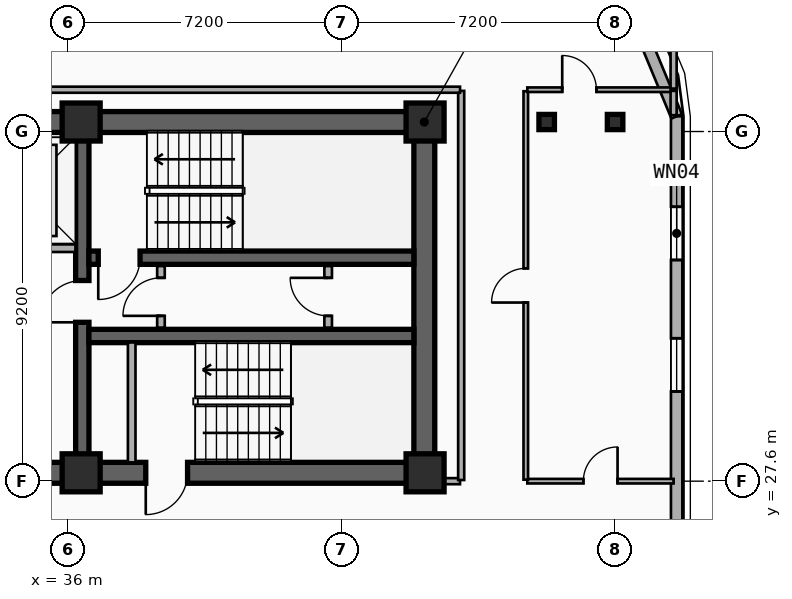
"""IFC4 building model, lengths in metres.
Left out: names, types, materials, properties, quantities, classifications, styles, units other than length and angle.
Written with IfcOpenShell. Run it as: python <this file> out.ifc"""

import sys

from ifc_helpers import new_model, si_unit, direction, frame, frame_2d, origin, origin_2d, place, context, subcontext, project, spatial, rectangle, i_section, extrude, element, fill, save


model = new_model("IFC4")
c1 = context("Model", 3, precision=1e-05, world=origin(), true_north=direction((0.0, 1.0)))
c2 = subcontext(c1, "Body", "Model", "MODEL_VIEW")
j1 = project(units=[si_unit("LENGTHUNIT", "METRE"), si_unit("PLANEANGLEUNIT", "RADIAN")], contexts=[c1])
p1 = place(None, origin())
s1 = spatial("IfcSite", under=j1, at=p1, CompositionType="ELEMENT")
p2 = place(p1, origin())
s2 = spatial("IfcBuilding", under=s1, at=p2, CompositionType="ELEMENT")
p3 = place(p2, frame((0.0, 0.0, 200.4)))
s3 = spatial("IfcBuildingStorey", under=s2, at=p3, CompositionType="ELEMENT", Elevation=200.4)
p4 = place(p3, frame((12.15, 37.05, 0.0), z_axis=(0.0, 0.0, 1.0), x_axis=(1.0, 0.0, 0.0)))
e1 = element("IfcWall", 1, at=p4, inside=s3, PredefinedType="SHEAR", context=c2, shape_type="SweptSolid", body=[
    extrude(rectangle(XDim=33.23, YDim=0.55, at=frame_2d((16.615, 0.0))), origin(), (0.0, 0.0, 1.0), 3.6),
])
p5 = place(p3, frame((45.38, 27.82, 0.0), z_axis=(0.0, 0.0, 1.0), x_axis=(-1.0, 0.0, 0.0)))
e2 = element("IfcWall", 2, at=p5, inside=s3, PredefinedType="SHEAR", context=c2, shape_type="SweptSolid", body=[
    extrude(rectangle(XDim=12.23, YDim=0.55, at=frame_2d((6.115, 0.0))), origin(), (0.0, 0.0, 1.0), 3.6),
])
p6 = place(p5, frame((9.93, 0.0, 0.0)))
e3 = element("IfcOpeningElement", 3, at=p6, cuts=e2, PredefinedType="OPENING", context=c2, shape_type="SweptSolid", body=[
    extrude(rectangle(XDim=1.1, YDim=2.15, at=frame_2d((0.55, 1.075))), frame((0.0, 0.285, 0.0), z_axis=(0.0, -1.0, 0.0), x_axis=(1.0, 0.0, 0.0)), (0.0, 0.0, 1.0), 0.57),
])
p7 = place(p5, frame((6.23, 0.0, 0.0)))
e4 = element("IfcOpeningElement", 4, at=p7, cuts=e2, PredefinedType="OPENING", context=c2, shape_type="SweptSolid", body=[
    extrude(rectangle(XDim=1.1, YDim=2.15, at=frame_2d((0.55, 1.075))), frame((0.0, 0.285, 0.0), z_axis=(0.0, -1.0, 0.0), x_axis=(1.0, 0.0, 0.0)), (0.0, 0.0, 1.0), 0.57),
])
p8 = place(p3, frame((45.38, 28.095, 0.0), z_axis=(0.0, 0.0, 1.0), x_axis=(0.0, 1.0, 0.0)))
e5 = element("IfcWall", 5, at=p8, inside=s3, PredefinedType="SHEAR", context=c2, shape_type="SweptSolid", body=[
    extrude(rectangle(XDim=8.68, YDim=0.55, at=frame_2d((4.34, 0.0))), origin(), (0.0, 0.0, 1.0), 3.6),
])
p9 = place(p3, frame((36.38, 28.095, 0.0), z_axis=(0.0, 0.0, 1.0), x_axis=(0.0, 1.0, 0.0)))
e6 = element("IfcWall", 6, at=p9, inside=s3, PredefinedType="SHEAR", context=c2, shape_type="SweptSolid", body=[
    extrude(rectangle(XDim=8.68, YDim=0.35, at=frame_2d((4.34, 0.0))), origin(), (0.0, 0.0, 1.0), 3.6),
])
p10 = place(p9, frame((3.685, 0.0, 0.0)))
e7 = element("IfcOpeningElement", 7, at=p10, cuts=e6, PredefinedType="OPENING", context=c2, shape_type="SweptSolid", body=[
    extrude(rectangle(XDim=1.1, YDim=2.15, at=frame_2d((0.55, 1.075))), frame((0.0, 0.185, 0.0), z_axis=(0.0, -1.0, 0.0), x_axis=(1.0, 0.0, 0.0)), (0.0, 0.0, 1.0), 0.37),
])
p11 = place(p3, frame((45.105, 33.48, 0.0), z_axis=(0.0, 0.0, 1.0), x_axis=(-1.0, 0.0, 0.0)))
e8 = element("IfcWall", 8, at=p11, inside=s3, PredefinedType="SHEAR", context=c2, shape_type="SweptSolid", body=[
    extrude(rectangle(XDim=8.55, YDim=0.35, at=frame_2d((4.275, 0.0))), origin(), (0.0, 0.0, 1.0), 3.6),
])
p12 = place(p11, frame((7.205, 0.0, 0.0)))
e9 = element("IfcOpeningElement", 9, at=p12, cuts=e8, PredefinedType="OPENING", context=c2, shape_type="SweptSolid", body=[
    extrude(rectangle(XDim=1.1, YDim=2.15, at=frame_2d((0.55, 1.075))), frame((0.0, 0.185, 0.0), z_axis=(0.0, -1.0, 0.0), x_axis=(1.0, 0.0, 0.0)), (0.0, 0.0, 1.0), 0.37),
])
p13 = place(p3, frame((36.555, 31.42, 0.0), z_axis=(0.0, 0.0, 1.0), x_axis=(1.0, 0.0, 0.0)))
e10 = element("IfcWall", 10, at=p13, inside=s3, PredefinedType="SHEAR", context=c2, shape_type="SweptSolid", body=[
    extrude(rectangle(XDim=8.55, YDim=0.35, at=frame_2d((4.275, 0.0))), origin(), (0.0, 0.0, 1.0), 3.6),
])
for number, where, z_axis, x_axis in (
    (11, (36.35, 27.82, 0.0), (0.0, 0.0, 1.0), (1.0, 0.0, 0.0)),
    (12, (36.35, 37.05, 0.0), (0.0, 0.0, 1.0), (1.0, 0.0, 0.0)),
    (13, (45.4, 27.82, 0.0), (0.0, 0.0, 1.0), (1.0, 0.0, 0.0)),
    (14, (45.4, 37.05, 0.0), (0.0, 0.0, 1.0), (1.0, 0.0, 0.0)),
):
    element("IfcColumn", number, at=place(p3, frame(where, z_axis=z_axis, x_axis=x_axis)), inside=s3, PredefinedType="COLUMN", context=c2, shape_type="SweptSolid", body=[
        extrude(rectangle(XDim=1.0, YDim=1.0, at=origin_2d()), origin(), (0.0, 0.0, 1.0), 3.6),
    ])
for number, where, z_axis, x_axis in (
    (15, (48.6, 37.05, 0.0), (0.0, 0.0, 1.0), (1.0, 0.0, 0.0)),
    (16, (50.4, 37.05, 0.0), (0.0, 0.0, 1.0), (1.0, 0.0, 0.0)),
):
    element("IfcColumn", number, at=place(p3, frame(where, z_axis=z_axis, x_axis=x_axis)), inside=s3, PredefinedType="COLUMN", context=c2, shape_type="SweptSolid", body=[
        extrude(i_section(OverallWidth=0.408, OverallDepth=0.4, WebThickness=0.025, FlangeThickness=0.039, FilletRadius=0.015, at=origin_2d()), origin(), (0.0, 0.0, 1.0), 3.6),
    ])
p14 = place(p3, frame((52.02, 37.2, 0.0), z_axis=(0.0, 0.0, 1.0), x_axis=(0.0, -1.0, 0.0)))
e17 = element("IfcWall", 17, at=p14, inside=s3, PredefinedType="SOLIDWALL", context=c2, shape_type="SweptSolid", body=[
    extrude(rectangle(XDim=28.6, YDim=0.3, at=frame_2d((14.3, 0.0))), origin(), (0.0, 0.0, 1.0), 3.34),
])
p15 = place(p14, frame((2.38, 0.0, 0.34)))
e18 = element("IfcOpeningElement", 18, at=p15, cuts=e17, PredefinedType="OPENING", context=c2, shape_type="SweptSolid", body=[
    extrude(rectangle(XDim=1.4, YDim=2.1, at=frame_2d((0.7, 1.05))), frame((0.0, 0.16, 0.0), z_axis=(0.0, -1.0, 0.0), x_axis=(1.0, 0.0, 0.0)), (0.0, 0.0, 1.0), 0.32),
])
p16 = place(p14, frame((5.84, 0.0, 0.34)))
e19 = element("IfcOpeningElement", 19, at=p16, cuts=e17, PredefinedType="OPENING", context=c2, shape_type="SweptSolid", body=[
    extrude(rectangle(XDim=1.4, YDim=2.1, at=frame_2d((0.7, 1.05))), frame((0.0, 0.16, 0.0), z_axis=(0.0, -1.0, 0.0), x_axis=(1.0, 0.0, 0.0)), (0.0, 0.0, 1.0), 0.32),
])
p17 = place(p14, frame((16.527, 0.0, 0.34)))
e20 = element("IfcOpeningElement", 20, at=p17, cuts=e17, PredefinedType="OPENING", context=c2, shape_type="SweptSolid", body=[
    extrude(rectangle(XDim=1.4, YDim=2.1, at=frame_2d((0.7, 1.05))), frame((0.0, 0.16, 0.0), z_axis=(0.0, -1.0, 0.0), x_axis=(1.0, 0.0, 0.0)), (0.0, 0.0, 1.0), 0.32),
])
p18 = place(p14, frame((22.403, 0.0, 0.34)))
e21 = element("IfcOpeningElement", 21, at=p18, cuts=e17, PredefinedType="OPENING", context=c2, shape_type="SweptSolid", body=[
    extrude(rectangle(XDim=1.4, YDim=2.1, at=frame_2d((0.7, 1.05))), frame((0.0, 0.16, 0.0), z_axis=(0.0, -1.0, 0.0), x_axis=(1.0, 0.0, 0.0)), (0.0, 0.0, 1.0), 0.32),
])
p19 = place(p3, frame((50.843, 40.042, 0.0), z_axis=(0.0, 0.0, 1.0), x_axis=(0.382704529509, -0.923870793506, 0.0)))
e22 = element("IfcWall", 22, at=p19, inside=s3, PredefinedType="SOLIDWALL", context=c2, shape_type="SweptSolid", body=[
    extrude(rectangle(XDim=3.077, YDim=0.3, at=frame_2d((1.538, 0.0))), origin(), (0.0, 0.0, 1.0), 3.34),
])
p20 = place(p3, frame((33.475, 33.73, 0.0), z_axis=(0.0, 0.0, 1.0), x_axis=(1.0, 0.0, 0.0)))
e23 = element("IfcWall", 23, at=p20, inside=s3, PredefinedType="PARTITIONING", context=c2, shape_type="SweptSolid", body=[
    extrude(rectangle(XDim=2.725, YDim=0.2, at=frame_2d((1.362, 0.0))), origin(), (0.0, 0.0, 1.0), 2.41),
])
p21 = place(p20, frame((0.812, 0.0, 0.0)))
e24 = element("IfcOpeningElement", 24, at=p21, cuts=e23, PredefinedType="OPENING", context=c2, shape_type="SweptSolid", body=[
    extrude(rectangle(XDim=1.1, YDim=2.15, at=frame_2d((0.55, 1.075))), frame((0.0, 0.11, 0.0), z_axis=(0.0, -1.0, 0.0), x_axis=(1.0, 0.0, 0.0)), (0.0, 0.0, 1.0), 0.22),
])
p22 = place(p3, frame((37.68, 28.095, 0.0), z_axis=(0.0, 0.0, 1.0), x_axis=(0.0, 1.0, 0.0)))
e25 = element("IfcWall", 25, at=p22, inside=s3, PredefinedType="PARTITIONING", context=c2, shape_type="SweptSolid", body=[
    extrude(rectangle(XDim=3.155, YDim=0.2, at=frame_2d((1.578, 0.0))), origin(), (0.0, 0.0, 1.0), 2.72),
])
p23 = place(p3, frame((38.45, 31.64, 0.0), z_axis=(0.0, 0.0, 1.0), x_axis=(0.0, 1.0, 0.0)))
e26 = element("IfcWall", 26, at=p23, inside=s3, PredefinedType="PARTITIONING", context=c2, shape_type="SweptSolid", body=[
    extrude(rectangle(XDim=1.62, YDim=0.2, at=frame_2d((0.81, 0.0))), origin(), (0.0, 0.0, 1.0), 3.34),
])
p24 = place(p23, frame((0.31, 0.0, 0.0)))
e27 = element("IfcOpeningElement", 27, at=p24, cuts=e26, PredefinedType="OPENING", context=c2, shape_type="SweptSolid", body=[
    extrude(rectangle(XDim=1.0, YDim=2.15, at=frame_2d((0.5, 1.075))), frame((0.0, 0.11, 0.0), z_axis=(0.0, -1.0, 0.0), x_axis=(1.0, 0.0, 0.0)), (0.0, 0.0, 1.0), 0.22),
])
p25 = place(p3, frame((42.85, 31.64, 0.0), z_axis=(0.0, 0.0, 1.0), x_axis=(0.0, 1.0, 0.0)))
e28 = element("IfcWall", 28, at=p25, inside=s3, PredefinedType="PARTITIONING", context=c2, shape_type="SweptSolid", body=[
    extrude(rectangle(XDim=1.62, YDim=0.2, at=frame_2d((0.81, 0.0))), origin(), (0.0, 0.0, 1.0), 3.34),
])
p26 = place(p25, frame((0.31, 0.0, 0.0)))
e29 = element("IfcOpeningElement", 29, at=p26, cuts=e28, PredefinedType="OPENING", context=c2, shape_type="SweptSolid", body=[
    extrude(rectangle(XDim=1.0, YDim=2.15, at=frame_2d((0.5, 1.075))), frame((0.0, 0.11, 0.0), z_axis=(0.0, -1.0, 0.0), x_axis=(1.0, 0.0, 0.0)), (0.0, 0.0, 1.0), 0.22),
])
p27 = place(p3, frame((48.09, 27.6, 0.0), z_axis=(0.0, 0.0, 1.0), x_axis=(1.0, 0.0, 0.0)))
e30 = element("IfcWall", 30, at=p27, inside=s3, PredefinedType="PARTITIONING", context=c2, shape_type="SweptSolid", body=[
    extrude(rectangle(XDim=3.85, YDim=0.12, at=frame_2d((1.925, 0.0))), origin(), (0.0, 0.0, 1.0), 2.67),
])
p28 = place(p27, frame((1.475, 0.0, 0.0)))
e31 = element("IfcOpeningElement", 31, at=p28, cuts=e30, PredefinedType="OPENING", context=c2, shape_type="SweptSolid", body=[
    extrude(rectangle(XDim=0.9, YDim=2.1, at=frame_2d((0.45, 1.05))), frame((0.0, 0.07, 0.0), z_axis=(0.0, -1.0, 0.0), x_axis=(1.0, 0.0, 0.0)), (0.0, 0.0, 1.0), 0.14),
])
p29 = place(p3, frame((48.05, 27.64, 0.0), z_axis=(0.0, 0.0, 1.0), x_axis=(0.0, 1.0, 0.0)))
e32 = element("IfcWall", 32, at=p29, inside=s3, PredefinedType="PARTITIONING", context=c2, shape_type="SweptSolid", body=[
    extrude(rectangle(XDim=10.22, YDim=0.12, at=frame_2d((5.11, 0.0))), origin(), (0.0, 0.0, 1.0), 2.82),
])
p30 = place(p29, frame((4.66, 0.0, 0.0)))
e33 = element("IfcOpeningElement", 33, at=p30, cuts=e32, PredefinedType="OPENING", context=c2, shape_type="SweptSolid", body=[
    extrude(rectangle(XDim=0.9, YDim=2.1, at=frame_2d((0.45, 1.05))), frame((0.0, 0.07, 0.0), z_axis=(0.0, -1.0, 0.0), x_axis=(1.0, 0.0, 0.0)), (0.0, 0.0, 1.0), 0.14),
])
p31 = place(p3, frame((48.09, 37.9, 0.0), z_axis=(0.0, 0.0, 1.0), x_axis=(1.0, 0.0, 0.0)))
e34 = element("IfcWall", 34, at=p31, inside=s3, PredefinedType="PARTITIONING", context=c2, shape_type="SweptSolid", body=[
    extrude(rectangle(XDim=3.85, YDim=0.12, at=frame_2d((1.925, 0.0))), origin(), (0.0, 0.0, 1.0), 3.34),
])
p32 = place(p31, frame((0.919, 0.0, 0.0)))
e35 = element("IfcOpeningElement", 35, at=p32, cuts=e34, PredefinedType="OPENING", context=c2, shape_type="SweptSolid", body=[
    extrude(rectangle(XDim=0.9, YDim=2.1, at=frame_2d((0.45, 1.05))), frame((0.0, 0.07, 0.0), z_axis=(0.0, -1.0, 0.0), x_axis=(1.0, 0.0, 0.0)), (0.0, 0.0, 1.0), 0.14),
])
p33 = place(p3, frame((45.41, 27.6, 0.0), z_axis=(0.0, 0.0, 1.0), x_axis=(1.0, 0.0, 0.0)))
e36 = element("IfcWall", 36, at=p33, inside=s3, PredefinedType="PARTITIONING", context=c2, shape_type="SweptSolid", body=[
    extrude(rectangle(XDim=0.91, YDim=0.16, at=frame_2d((0.455, 0.0))), origin(), (0.0, 0.0, 1.0), 2.41),
])
p34 = place(p3, frame((46.35, 27.63, 0.0), z_axis=(0.0, 0.0, 1.0), x_axis=(0.0, 1.0, 0.0)))
e37 = element("IfcWall", 37, at=p34, inside=s3, PredefinedType="PARTITIONING", context=c2, shape_type="SweptSolid", body=[
    extrude(rectangle(XDim=10.24, YDim=0.16, at=frame_2d((5.12, 0.0))), origin(), (0.0, 0.0, 1.0), 2.82),
])
p35 = place(p3, frame((11.28, 37.9, 0.0), z_axis=(0.0, 0.0, 1.0), x_axis=(1.0, 0.0, 0.0)))
e38 = element("IfcWall", 38, at=p35, inside=s3, PredefinedType="PARTITIONING", context=c2, shape_type="SweptSolid", body=[
    extrude(rectangle(XDim=35.04, YDim=0.16, at=frame_2d((17.52, 0.0))), origin(), (0.0, 0.0, 1.0), 3.34),
])
p36 = place(p3, frame((51.94, 37.93, 0.0), z_axis=(0.0, 0.0, 1.0), x_axis=(0.0, 1.0, 0.0)))
e39 = element("IfcWall", 39, at=p36, inside=s3, PredefinedType="PARTITIONING", context=c2, shape_type="SweptSolid", body=[
    extrude(rectangle(XDim=1.44, YDim=0.16, at=frame_2d((0.72, 0.0))), origin(), (0.0, 0.0, 1.0), 3.34),
])
p37 = place(p3, frame((51.94, 37.23, 0.0), z_axis=(0.0, 0.0, 1.0), x_axis=(0.0, 1.0, 0.0)))
e40 = element("IfcWall", 40, at=p37, inside=s3, PredefinedType="PARTITIONING", context=c2, shape_type="SweptSolid", body=[
    extrude(rectangle(XDim=0.64, YDim=0.16, at=frame_2d((0.32, 0.0))), origin(), (0.0, 0.0, 1.0), 3.34),
])
p38 = place(p15, origin())
e41 = element("IfcWindow", 41, at=p38, inside=s3, PartitioningType="SINGLE_PANEL", PredefinedType="WINDOW", context=c2, shape_type="SweptSolid", body=[
    extrude(rectangle(XDim=1.4, YDim=2.1, at=frame_2d((0.7, 1.05))), frame((0.0, 0.03, 0.0), z_axis=(0.0, -1.0, 0.0), x_axis=(1.0, 0.0, 0.0)), (0.0, 0.0, 1.0), 0.06),
])
fill(e18, e41)
p39 = place(p16, origin())
e42 = element("IfcWindow", 42, at=p39, inside=s3, PartitioningType="SINGLE_PANEL", PredefinedType="WINDOW", context=c2, shape_type="SweptSolid", body=[
    extrude(rectangle(XDim=1.4, YDim=2.1, at=frame_2d((0.7, 1.05))), frame((0.0, 0.03, 0.0), z_axis=(0.0, -1.0, 0.0), x_axis=(1.0, 0.0, 0.0)), (0.0, 0.0, 1.0), 0.06),
])
fill(e19, e42)
p40 = place(p12, origin())
e43 = element("IfcDoor", 43, at=p40, inside=s3, OperationType="SINGLE_SWING_RIGHT", PredefinedType="DOOR", context=c2, shape_type="SweptSolid", body=[
    extrude(rectangle(XDim=1.1, YDim=2.15, at=frame_2d((0.55, 1.075))), frame((0.0, 0.025, 0.0), z_axis=(0.0, -1.0, 0.0), x_axis=(1.0, 0.0, 0.0)), (0.0, 0.0, 1.0), 0.05),
])
fill(e9, e43)
p41 = place(p10, origin())
e44 = element("IfcDoor", 44, at=p41, inside=s3, OperationType="SINGLE_SWING_LEFT", PredefinedType="DOOR", context=c2, shape_type="SweptSolid", body=[
    extrude(rectangle(XDim=1.1, YDim=2.15, at=frame_2d((0.55, 1.075))), frame((0.0, 0.025, 0.0), z_axis=(0.0, -1.0, 0.0), x_axis=(1.0, 0.0, 0.0)), (0.0, 0.0, 1.0), 0.05),
])
fill(e7, e44)
p42 = place(p7, origin())
e45 = element("IfcDoor", 45, at=p42, inside=s3, OperationType="SINGLE_SWING_RIGHT", PredefinedType="DOOR", context=c2, shape_type="SweptSolid", body=[
    extrude(rectangle(XDim=1.1, YDim=2.15, at=frame_2d((0.55, 1.075))), frame((0.0, 0.025, 0.0), z_axis=(0.0, -1.0, 0.0), x_axis=(1.0, 0.0, 0.0)), (0.0, 0.0, 1.0), 0.05),
])
fill(e4, e45)
p43 = place(p24, origin())
e46 = element("IfcDoor", 46, at=p43, inside=s3, OperationType="SINGLE_SWING_LEFT", PredefinedType="DOOR", context=c2, shape_type="SweptSolid", body=[
    extrude(rectangle(XDim=1.0, YDim=2.15, at=frame_2d((0.5, 1.075))), frame((0.0, 0.025, 0.0), z_axis=(0.0, -1.0, 0.0), x_axis=(1.0, 0.0, 0.0)), (0.0, 0.0, 1.0), 0.05),
])
fill(e27, e46)
p44 = place(p26, origin())
e47 = element("IfcDoor", 47, at=p44, inside=s3, OperationType="SINGLE_SWING_RIGHT", PredefinedType="DOOR", context=c2, shape_type="SweptSolid", body=[
    extrude(rectangle(XDim=1.0, YDim=2.15, at=frame_2d((0.5, 1.075))), frame((0.0, 0.025, 0.0), z_axis=(0.0, -1.0, 0.0), x_axis=(1.0, 0.0, 0.0)), (0.0, 0.0, 1.0), 0.05),
])
fill(e29, e47)
p45 = place(p28, origin())
e48 = element("IfcDoor", 48, at=p45, inside=s3, OperationType="SINGLE_SWING_RIGHT", PredefinedType="DOOR", context=c2, shape_type="SweptSolid", body=[
    extrude(rectangle(XDim=0.9, YDim=2.1, at=frame_2d((0.45, 1.05))), frame((0.0, 0.025, 0.0), z_axis=(0.0, -1.0, 0.0), x_axis=(1.0, 0.0, 0.0)), (0.0, 0.0, 1.0), 0.05),
])
fill(e31, e48)
p46 = place(p30, origin())
e49 = element("IfcDoor", 49, at=p46, inside=s3, OperationType="SINGLE_SWING_LEFT", PredefinedType="DOOR", context=c2, shape_type="SweptSolid", body=[
    extrude(rectangle(XDim=0.9, YDim=2.1, at=frame_2d((0.45, 1.05))), frame((0.0, 0.025, 0.0), z_axis=(0.0, -1.0, 0.0), x_axis=(1.0, 0.0, 0.0)), (0.0, 0.0, 1.0), 0.05),
])
fill(e33, e49)
p47 = place(p32, origin())
e50 = element("IfcDoor", 50, at=p47, inside=s3, OperationType="SINGLE_SWING_LEFT", PredefinedType="DOOR", context=c2, shape_type="SweptSolid", body=[
    extrude(rectangle(XDim=0.9, YDim=2.1, at=frame_2d((0.45, 1.05))), frame((0.0, 0.025, 0.0), z_axis=(0.0, -1.0, 0.0), x_axis=(1.0, 0.0, 0.0)), (0.0, 0.0, 1.0), 0.05),
])
fill(e35, e50)
save(model, sys.argv[1])
